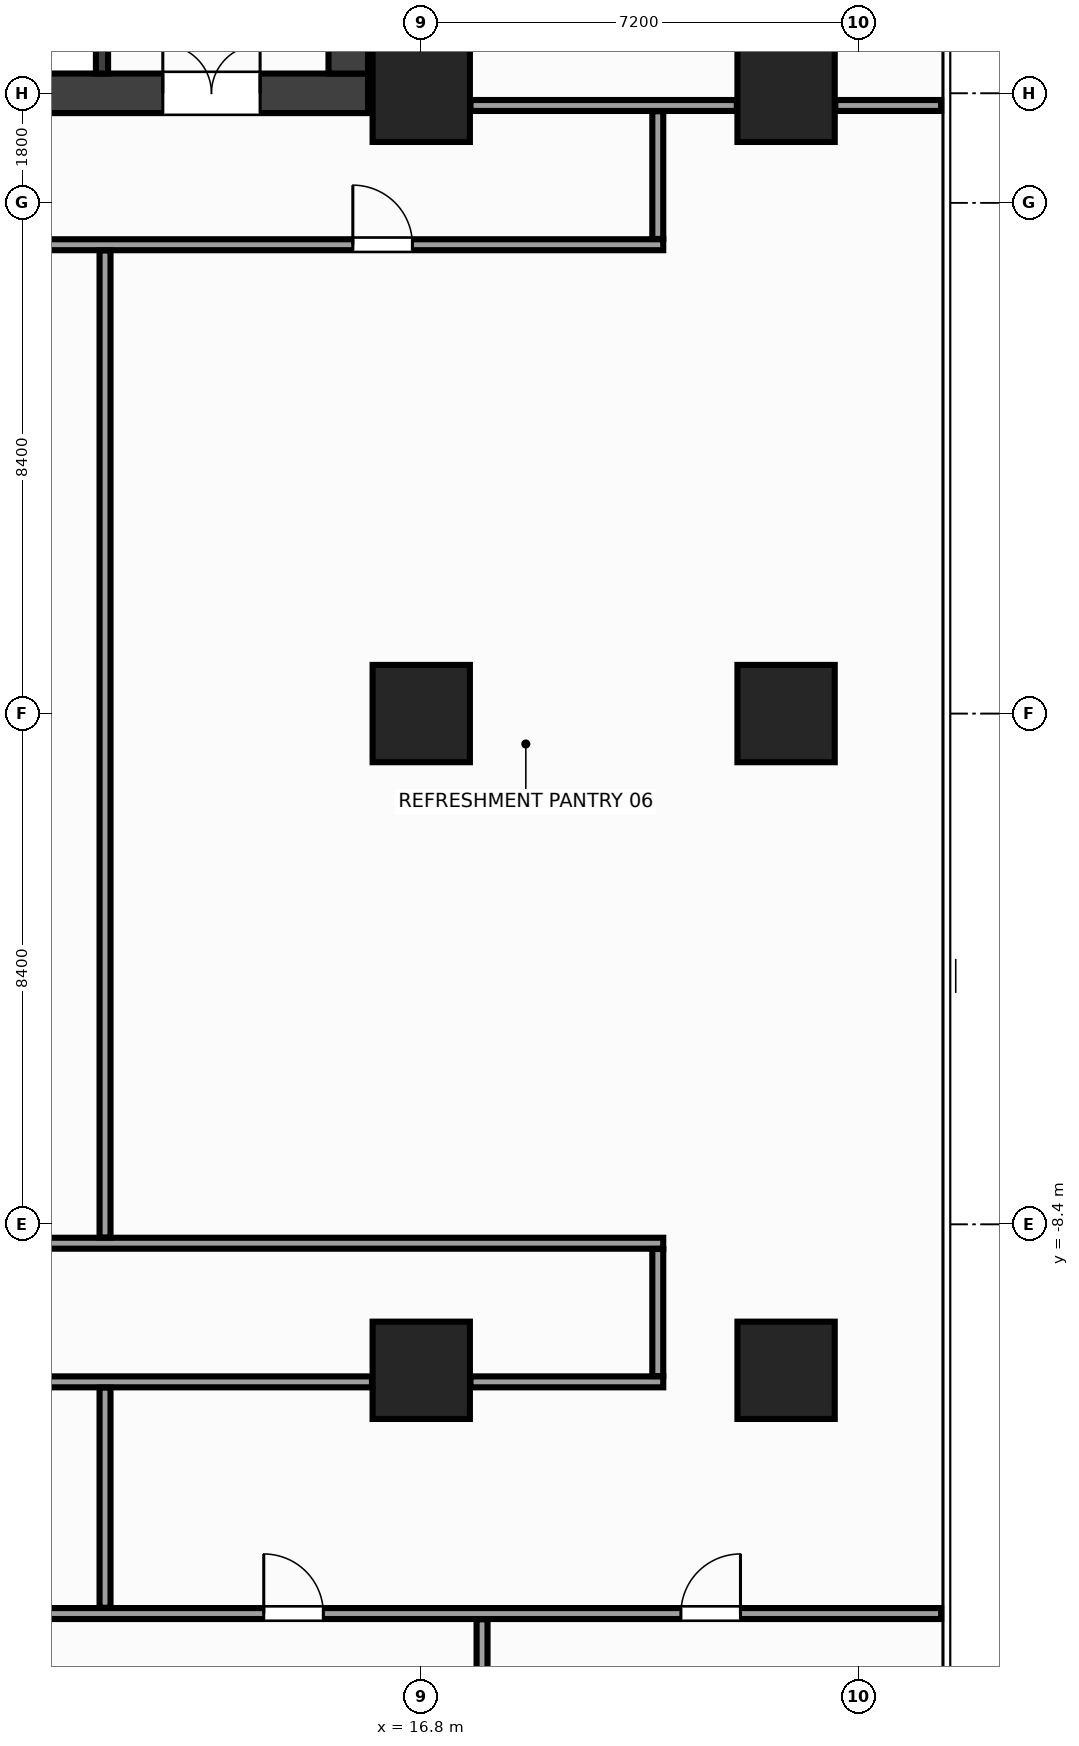
"""IFC4 building model, lengths in metres.
Left out: names, types, materials, properties, quantities, classifications, styles, units other than length and angle.
Written with IfcOpenShell. Run it as: python <this file> out.ifc"""

import sys

from ifc_helpers import new_model, si_unit, direction, frame, frame_2d, origin, origin_2d, place, context, subcontext, project, spatial, rectangle, extrude, source, transform, mapped, element, fill, save


model = new_model("IFC4")
c1 = context("Model", 3, precision=1e-05, world=origin(), true_north=direction((0.0, 1.0)))
c2 = subcontext(c1, "Body", "Model", "MODEL_VIEW")
j1 = project(units=[si_unit("LENGTHUNIT", "METRE"), si_unit("PLANEANGLEUNIT", "RADIAN")], contexts=[c1])
p1 = place(None, origin())
s1 = spatial("IfcSite", under=j1, at=p1, CompositionType="ELEMENT")
p2 = place(p1, origin())
s2 = spatial("IfcBuilding", under=s1, at=p2, CompositionType="ELEMENT")
p3 = place(p2, frame((0.0, 0.0, 117.2)))
s3 = spatial("IfcBuildingStorey", under=s2, at=p3, CompositionType="ELEMENT", Elevation=117.2)
m1 = source(origin(), c2, "Body", "SweptSolid", [
    extrude(rectangle(XDim=31.85, YDim=0.65, at=frame_2d((15.925, 0.0))), origin(), (0.0, 0.0, 1.0), 3.6),
])
p4 = place(p3, frame((-15.925, 10.2, 0.0), z_axis=(0.0, 0.0, 1.0), x_axis=(1.0, 0.0, 0.0)))
e1 = element("IfcWall", 1, at=p4, inside=s3, PredefinedType="SHEAR", context=c2, shape_type="MappedRepresentation", body=[
    mapped(m1, transform((0.0, 0.0, 0.0), x_axis=(1.0, 0.0, 0.0), y_axis=(0.0, 1.0, 0.0), z_axis=(0.0, 0.0, 1.0), scale=1.0)),
])
p5 = place(p4, frame((1.775, 0.0, 0.0)))
e2 = element("IfcOpeningElement", 2, at=p5, cuts=e1, PredefinedType="OPENING", context=c2, shape_type="SweptSolid", body=[
    extrude(rectangle(XDim=1.6, YDim=2.15, at=frame_2d((0.8, 1.075))), frame((0.0, 0.337, 0.0), z_axis=(0.0, -1.0, 0.0), x_axis=(1.0, 0.0, 0.0)), (0.0, 0.0, 1.0), 0.674),
])
p6 = place(p4, frame((28.475, 0.0, 0.0)))
e3 = element("IfcOpeningElement", 3, at=p6, cuts=e1, PredefinedType="OPENING", context=c2, shape_type="SweptSolid", body=[
    extrude(rectangle(XDim=1.6, YDim=2.15, at=frame_2d((0.8, 1.075))), frame((0.0, 0.337, 0.0), z_axis=(0.0, -1.0, 0.0), x_axis=(1.0, 0.0, 0.0)), (0.0, 0.0, 1.0), 0.674),
])
p7 = place(p4, frame((15.175, 0.0, 0.0)))
e4 = element("IfcOpeningElement", 4, at=p7, cuts=e1, PredefinedType="OPENING", context=c2, shape_type="SweptSolid", body=[
    extrude(rectangle(XDim=1.5, YDim=2.2, at=frame_2d((0.75, 1.1))), frame((0.0, 0.337, 0.0), z_axis=(0.0, -1.0, 0.0), x_axis=(1.0, 0.0, 0.0)), (0.0, 0.0, 1.0), 0.674),
])
m2 = source(origin(), c2, "Body", "SweptSolid", [
    extrude(rectangle(XDim=12.95, YDim=0.65, at=frame_2d((6.475, 0.0))), origin(), (0.0, 0.0, 1.0), 3.6),
])
p8 = place(p3, frame((15.6, 10.525, 0.0), z_axis=(0.0, 0.0, 1.0), x_axis=(0.0, 1.0, 0.0)))
e5 = element("IfcWall", 5, at=p8, inside=s3, PredefinedType="SHEAR", context=c2, shape_type="MappedRepresentation", body=[
    mapped(m2, transform((0.0, 0.0, 0.0), x_axis=(1.0, 0.0, 0.0), y_axis=(0.0, 1.0, 0.0), z_axis=(0.0, 0.0, 1.0), scale=1.0)),
])
m3 = source(origin(), c2, "Body", "SweptSolid", [
    extrude(rectangle(XDim=3.125, YDim=0.2, at=frame_2d((1.562, 0.0))), origin(), (0.0, 0.0, 1.0), 3.6),
])
p9 = place(p3, frame((11.55, 10.525, 0.0), z_axis=(0.0, 0.0, 1.0), x_axis=(0.0, 1.0, 0.0)))
e6 = element("IfcWall", 6, at=p9, inside=s3, PredefinedType="SHEAR", context=c2, shape_type="MappedRepresentation", body=[
    mapped(m3, transform((0.0, 0.0, 0.0), x_axis=(1.0, 0.0, 0.0), y_axis=(0.0, 1.0, 0.0), z_axis=(0.0, 0.0, 1.0), scale=1.0)),
])
p10 = place(p9, frame((0.9, 0.0, 0.0)))
e7 = element("IfcOpeningElement", 7, at=p10, cuts=e6, PredefinedType="OPENING", context=c2, shape_type="SweptSolid", body=[
    extrude(rectangle(XDim=1.1, YDim=2.15, at=frame_2d((0.55, 1.075))), frame((0.0, 0.112, 0.0), z_axis=(0.0, -1.0, 0.0), x_axis=(1.0, 0.0, 0.0)), (0.0, 0.0, 1.0), 0.224),
])
m4 = source(origin(), c2, "Body", "SweptSolid", [
    extrude(rectangle(XDim=1.6, YDim=1.6, at=origin_2d()), origin(), (0.0, 0.0, 1.0), 3.6),
])
for number, where, z_axis, x_axis in (
    (8, (16.8, -10.8, 0.0), (0.0, 0.0, 1.0), (1.0, 0.0, 0.0)),
    (9, (16.8, 0.0, 0.0), (0.0, 0.0, 1.0), (1.0, 0.0, 0.0)),
    (10, (16.8, 10.2, 0.0), (0.0, 0.0, 1.0), (1.0, 0.0, 0.0)),
    (11, (22.8, -10.8, 0.0), (0.0, 0.0, 1.0), (1.0, 0.0, 0.0)),
    (12, (22.8, 0.0, 0.0), (0.0, 0.0, 1.0), (1.0, 0.0, 0.0)),
    (13, (22.8, 10.2, 0.0), (0.0, 0.0, 1.0), (1.0, 0.0, 0.0)),
):
    element("IfcColumn", number, at=place(p3, frame(where, z_axis=z_axis, x_axis=x_axis)), inside=s3, PredefinedType="COLUMN", context=c2, shape_type="MappedRepresentation", body=[
        mapped(m4, transform((0.0, 0.0, 0.0), x_axis=(1.0, 0.0, 0.0), y_axis=(0.0, 1.0, 0.0), z_axis=(0.0, 0.0, 1.0), scale=1.0)),
    ])
m5 = source(origin(), c2, "Body", "SweptSolid", [
    extrude(rectangle(XDim=4.38, YDim=0.18, at=frame_2d((2.19, 0.0))), origin(), (0.0, 0.0, 1.0), 2.745),
])
p11 = place(p3, frame((17.61, 10.0, 0.0), z_axis=(0.0, 0.0, 1.0), x_axis=(1.0, 0.0, 0.0)))
e14 = element("IfcWall", 14, at=p11, inside=s3, PredefinedType="PARTITIONING", context=c2, shape_type="MappedRepresentation", body=[
    mapped(m5, transform((0.0, 0.0, 0.0), x_axis=(1.0, 0.0, 0.0), y_axis=(0.0, 1.0, 0.0), z_axis=(0.0, 0.0, 1.0), scale=1.0)),
])
m6 = source(origin(), c2, "Body", "SweptSolid", [
    extrude(rectangle(XDim=1.74, YDim=0.18, at=frame_2d((0.87, 0.0))), origin(), (0.0, 0.0, 1.0), 3.36),
])
p12 = place(p3, frame((23.61, 10.0, 0.0), z_axis=(0.0, 0.0, 1.0), x_axis=(1.0, 0.0, 0.0)))
e15 = element("IfcWall", 15, at=p12, inside=s3, PredefinedType="PARTITIONING", context=c2, shape_type="MappedRepresentation", body=[
    mapped(m6, transform((0.0, 0.0, 0.0), x_axis=(1.0, 0.0, 0.0), y_axis=(0.0, 1.0, 0.0), z_axis=(0.0, 0.0, 1.0), scale=1.0)),
])
m7 = source(origin(), c2, "Body", "SweptSolid", [
    extrude(rectangle(XDim=22.3, YDim=0.18, at=frame_2d((11.15, 0.0))), origin(), (0.0, 0.0, 1.0), 2.745),
])
p13 = place(p3, frame((-1.52, 7.71, 0.0), z_axis=(0.0, 0.0, 1.0), x_axis=(1.0, 0.0, 0.0)))
e16 = element("IfcWall", 16, at=p13, inside=s3, PredefinedType="PARTITIONING", context=c2, shape_type="MappedRepresentation", body=[
    mapped(m7, transform((0.0, 0.0, 0.0), x_axis=(1.0, 0.0, 0.0), y_axis=(0.0, 1.0, 0.0), z_axis=(0.0, 0.0, 1.0), scale=1.0)),
])
p14 = place(p13, frame((0.685, 0.0, 0.0)))
e17 = element("IfcOpeningElement", 17, at=p14, cuts=e16, PredefinedType="OPENING", context=c2, shape_type="SweptSolid", body=[
    extrude(rectangle(XDim=0.98, YDim=2.15, at=frame_2d((0.49, 1.075))), frame((0.0, 0.102, 0.0), z_axis=(0.0, -1.0, 0.0), x_axis=(1.0, 0.0, 0.0)), (0.0, 0.0, 1.0), 0.204),
])
p15 = place(p13, frame((7.23, 0.0, 0.0)))
e18 = element("IfcOpeningElement", 18, at=p15, cuts=e16, PredefinedType="OPENING", context=c2, shape_type="SweptSolid", body=[
    extrude(rectangle(XDim=0.98, YDim=2.15, at=frame_2d((0.49, 1.075))), frame((0.0, 0.102, 0.0), z_axis=(0.0, -1.0, 0.0), x_axis=(1.0, 0.0, 0.0)), (0.0, 0.0, 1.0), 0.204),
])
p16 = place(p13, frame((17.195, 0.0, 0.0)))
e19 = element("IfcOpeningElement", 19, at=p16, cuts=e16, PredefinedType="OPENING", context=c2, shape_type="SweptSolid", body=[
    extrude(rectangle(XDim=0.98, YDim=2.15, at=frame_2d((0.49, 1.075))), frame((0.0, 0.102, 0.0), z_axis=(0.0, -1.0, 0.0), x_axis=(1.0, 0.0, 0.0)), (0.0, 0.0, 1.0), 0.204),
])
p17 = place(p3, frame((-1.52, -8.71, 0.0), z_axis=(0.0, 0.0, 1.0), x_axis=(1.0, 0.0, 0.0)))
e20 = element("IfcWall", 20, at=p17, inside=s3, PredefinedType="PARTITIONING", context=c2, shape_type="MappedRepresentation", body=[
    mapped(m7, transform((0.0, 0.0, 0.0), x_axis=(1.0, 0.0, 0.0), y_axis=(0.0, 1.0, 0.0), z_axis=(0.0, 0.0, 1.0), scale=1.0)),
])
m8 = source(origin(), c2, "Body", "SweptSolid", [
    extrude(rectangle(XDim=7.08, YDim=0.18, at=frame_2d((3.54, 0.0))), origin(), (0.0, 0.0, 1.0), 2.745),
])
p18 = place(p3, frame((8.91, -10.99, 0.0), z_axis=(0.0, 0.0, 1.0), x_axis=(1.0, 0.0, 0.0)))
e21 = element("IfcWall", 21, at=p18, inside=s3, PredefinedType="PARTITIONING", context=c2, shape_type="MappedRepresentation", body=[
    mapped(m8, transform((0.0, 0.0, 0.0), x_axis=(1.0, 0.0, 0.0), y_axis=(0.0, 1.0, 0.0), z_axis=(0.0, 0.0, 1.0), scale=1.0)),
])
m9 = source(origin(), c2, "Body", "SweptSolid", [
    extrude(rectangle(XDim=3.17, YDim=0.18, at=frame_2d((1.585, 0.0))), origin(), (0.0, 0.0, 1.0), 2.745),
])
p19 = place(p3, frame((17.61, -10.99, 0.0), z_axis=(0.0, 0.0, 1.0), x_axis=(1.0, 0.0, 0.0)))
e22 = element("IfcWall", 22, at=p19, inside=s3, PredefinedType="PARTITIONING", context=c2, shape_type="MappedRepresentation", body=[
    mapped(m9, transform((0.0, 0.0, 0.0), x_axis=(1.0, 0.0, 0.0), y_axis=(0.0, 1.0, 0.0), z_axis=(0.0, 0.0, 1.0), scale=1.0)),
])
m10 = source(origin(), c2, "Body", "SweptSolid", [
    extrude(rectangle(XDim=2.1, YDim=0.18, at=frame_2d((1.05, 0.0))), origin(), (0.0, 0.0, 1.0), 3.36),
])
p20 = place(p3, frame((20.69, 7.805, 0.0), z_axis=(0.0, 0.0, 1.0), x_axis=(0.0, 1.0, 0.0)))
e23 = element("IfcWall", 23, at=p20, inside=s3, PredefinedType="PARTITIONING", context=c2, shape_type="MappedRepresentation", body=[
    mapped(m10, transform((0.0, 0.0, 0.0), x_axis=(1.0, 0.0, 0.0), y_axis=(0.0, 1.0, 0.0), z_axis=(0.0, 0.0, 1.0), scale=1.0)),
])
m11 = source(origin(), c2, "Body", "SweptSolid", [
    extrude(rectangle(XDim=2.09, YDim=0.18, at=frame_2d((1.045, 0.0))), origin(), (0.0, 0.0, 1.0), 3.36),
])
p21 = place(p3, frame((20.69, -10.895, 0.0), z_axis=(0.0, 0.0, 1.0), x_axis=(0.0, 1.0, 0.0)))
e24 = element("IfcWall", 24, at=p21, inside=s3, PredefinedType="PARTITIONING", context=c2, shape_type="MappedRepresentation", body=[
    mapped(m11, transform((0.0, 0.0, 0.0), x_axis=(1.0, 0.0, 0.0), y_axis=(0.0, 1.0, 0.0), z_axis=(0.0, 0.0, 1.0), scale=1.0)),
])
m12 = source(origin(), c2, "Body", "SweptSolid", [
    extrude(rectangle(XDim=50.7, YDim=0.18, at=frame_2d((25.35, 0.0))), origin(), (0.0, 0.0, 1.0), 2.945),
])
p22 = place(p3, frame((-25.35, -14.8, 0.0), z_axis=(0.0, 0.0, 1.0), x_axis=(1.0, 0.0, 0.0)))
e25 = element("IfcWall", 25, at=p22, inside=s3, PredefinedType="PARTITIONING", context=c2, shape_type="MappedRepresentation", body=[
    mapped(m12, transform((0.0, 0.0, 0.0), x_axis=(1.0, 0.0, 0.0), y_axis=(0.0, 1.0, 0.0), z_axis=(0.0, 0.0, 1.0), scale=1.0)),
])
p23 = place(p22, frame((2.7, 0.0, 0.0)))
e26 = element("IfcOpeningElement", 26, at=p23, cuts=e25, PredefinedType="OPENING", context=c2, shape_type="SweptSolid", body=[
    extrude(rectangle(XDim=0.98, YDim=2.15, at=frame_2d((0.49, 1.075))), frame((0.0, 0.102, 0.0), z_axis=(0.0, -1.0, 0.0), x_axis=(1.0, 0.0, 0.0)), (0.0, 0.0, 1.0), 0.204),
])
p24 = place(p22, frame((46.42, 0.0, 0.0)))
e27 = element("IfcOpeningElement", 27, at=p24, cuts=e25, PredefinedType="OPENING", context=c2, shape_type="SweptSolid", body=[
    extrude(rectangle(XDim=0.98, YDim=2.15, at=frame_2d((0.49, 1.075))), frame((0.0, 0.102, 0.0), z_axis=(0.0, -1.0, 0.0), x_axis=(1.0, 0.0, 0.0)), (0.0, 0.0, 1.0), 0.204),
])
p25 = place(p22, frame((13.16, 0.0, 0.0)))
e28 = element("IfcOpeningElement", 28, at=p25, cuts=e25, PredefinedType="OPENING", context=c2, shape_type="SweptSolid", body=[
    extrude(rectangle(XDim=0.98, YDim=2.15, at=frame_2d((0.49, 1.075))), frame((0.0, 0.102, 0.0), z_axis=(0.0, -1.0, 0.0), x_axis=(1.0, 0.0, 0.0)), (0.0, 0.0, 1.0), 0.204),
])
p26 = place(p22, frame((22.16, 0.0, 0.0)))
e29 = element("IfcOpeningElement", 29, at=p26, cuts=e25, PredefinedType="OPENING", context=c2, shape_type="SweptSolid", body=[
    extrude(rectangle(XDim=0.98, YDim=2.15, at=frame_2d((0.49, 1.075))), frame((0.0, 0.102, 0.0), z_axis=(0.0, -1.0, 0.0), x_axis=(1.0, 0.0, 0.0)), (0.0, 0.0, 1.0), 0.204),
])
p27 = place(p22, frame((30.66, 0.0, 0.0)))
e30 = element("IfcOpeningElement", 30, at=p27, cuts=e25, PredefinedType="OPENING", context=c2, shape_type="SweptSolid", body=[
    extrude(rectangle(XDim=0.98, YDim=2.15, at=frame_2d((0.49, 1.075))), frame((0.0, 0.102, 0.0), z_axis=(0.0, -1.0, 0.0), x_axis=(1.0, 0.0, 0.0)), (0.0, 0.0, 1.0), 0.204),
])
p28 = place(p22, frame((8.96, 0.0, 0.0)))
e31 = element("IfcOpeningElement", 31, at=p28, cuts=e25, PredefinedType="OPENING", context=c2, shape_type="SweptSolid", body=[
    extrude(rectangle(XDim=0.98, YDim=2.15, at=frame_2d((0.49, 1.075))), frame((0.0, 0.102, 0.0), z_axis=(0.0, -1.0, 0.0), x_axis=(1.0, 0.0, 0.0)), (0.0, 0.0, 1.0), 0.204),
])
p29 = place(p22, frame((39.56, 0.0, 0.0)))
e32 = element("IfcOpeningElement", 32, at=p29, cuts=e25, PredefinedType="OPENING", context=c2, shape_type="SweptSolid", body=[
    extrude(rectangle(XDim=0.98, YDim=2.15, at=frame_2d((0.49, 1.075))), frame((0.0, 0.102, 0.0), z_axis=(0.0, -1.0, 0.0), x_axis=(1.0, 0.0, 0.0)), (0.0, 0.0, 1.0), 0.204),
])
m13 = source(origin(), c2, "Body", "SweptSolid", [
    extrude(rectangle(XDim=3.62, YDim=0.18, at=frame_2d((1.81, 0.0))), origin(), (0.0, 0.0, 1.0), 3.36),
])
p30 = place(p3, frame((11.6, -14.705, 0.0), z_axis=(0.0, 0.0, 1.0), x_axis=(0.0, 1.0, 0.0)))
e33 = element("IfcWall", 33, at=p30, inside=s3, PredefinedType="PARTITIONING", context=c2, shape_type="MappedRepresentation", body=[
    mapped(m13, transform((0.0, 0.0, 0.0), x_axis=(1.0, 0.0, 0.0), y_axis=(0.0, 1.0, 0.0), z_axis=(0.0, 0.0, 1.0), scale=1.0)),
])
m14 = source(origin(), c2, "Body", "SweptSolid", [
    extrude(rectangle(XDim=16.23, YDim=0.18, at=frame_2d((8.115, 0.0))), origin(), (0.0, 0.0, 1.0), 2.645),
])
p31 = place(p3, frame((11.6, -8.615, 0.0), z_axis=(0.0, 0.0, 1.0), x_axis=(0.0, 1.0, 0.0)))
e34 = element("IfcWall", 34, at=p31, inside=s3, PredefinedType="PARTITIONING", context=c2, shape_type="MappedRepresentation", body=[
    mapped(m14, transform((0.0, 0.0, 0.0), x_axis=(1.0, 0.0, 0.0), y_axis=(0.0, 1.0, 0.0), z_axis=(0.0, 0.0, 1.0), scale=1.0)),
])
m15 = source(origin(), c2, "Body", "SweptSolid", [
    extrude(rectangle(XDim=10.755, YDim=0.18, at=frame_2d((5.377, 0.0))), origin(), (0.0, 0.0, 1.0), 2.745),
])
p32 = place(p3, frame((17.8, -25.65, 0.0), z_axis=(0.0, 0.0, 1.0), x_axis=(0.0, 1.0, 0.0)))
e35 = element("IfcWall", 35, at=p32, inside=s3, PredefinedType="PARTITIONING", context=c2, shape_type="MappedRepresentation", body=[
    mapped(m15, transform((0.0, 0.0, 0.0), x_axis=(1.0, 0.0, 0.0), y_axis=(0.0, 1.0, 0.0), z_axis=(0.0, 0.0, 1.0), scale=1.0)),
])
m16 = source(origin(), c2, "Body", "SweptSolid", [
    extrude(rectangle(XDim=1.6, YDim=2.15, at=frame_2d((0.8, 1.075))), frame((0.0, 0.025, 0.0), z_axis=(0.0, -1.0, 0.0), x_axis=(1.0, 0.0, 0.0)), (0.0, 0.0, 1.0), 0.05),
])
p33 = place(p6, origin())
e36 = element("IfcDoor", 36, at=p33, inside=s3, OperationType="DOUBLE_DOOR_SINGLE_SWING", PredefinedType="DOOR", context=c2, shape_type="MappedRepresentation", body=[
    mapped(m16, transform((0.0, 0.0, 0.0), x_axis=(1.0, 0.0, 0.0), y_axis=(0.0, 1.0, 0.0), z_axis=(0.0, 0.0, 1.0), scale=1.0)),
])
fill(e3, e36)
m17 = source(origin(), c2, "Body", "SweptSolid", [
    extrude(rectangle(XDim=0.98, YDim=2.15, at=frame_2d((0.49, 1.075))), frame((0.0, 0.025, 0.0), z_axis=(0.0, -1.0, 0.0), x_axis=(1.0, 0.0, 0.0)), (0.0, 0.0, 1.0), 0.05),
])
p34 = place(p16, origin())
e37 = element("IfcDoor", 37, at=p34, inside=s3, OperationType="SINGLE_SWING_LEFT", PredefinedType="DOOR", context=c2, shape_type="MappedRepresentation", body=[
    mapped(m17, transform((0.0, 0.0, 0.0), x_axis=(1.0, 0.0, 0.0), y_axis=(0.0, 1.0, 0.0), z_axis=(0.0, 0.0, 1.0), scale=1.0)),
])
fill(e19, e37)
p35 = place(p24, origin())
e38 = element("IfcDoor", 38, at=p35, inside=s3, OperationType="SINGLE_SWING_RIGHT", PredefinedType="DOOR", context=c2, shape_type="MappedRepresentation", body=[
    mapped(m17, transform((0.0, 0.0, 0.0), x_axis=(1.0, 0.0, 0.0), y_axis=(0.0, 1.0, 0.0), z_axis=(0.0, 0.0, 1.0), scale=1.0)),
])
fill(e27, e38)
p36 = place(p29, origin())
e39 = element("IfcDoor", 39, at=p36, inside=s3, OperationType="SINGLE_SWING_LEFT", PredefinedType="DOOR", context=c2, shape_type="MappedRepresentation", body=[
    mapped(m17, transform((0.0, 0.0, 0.0), x_axis=(1.0, 0.0, 0.0), y_axis=(0.0, 1.0, 0.0), z_axis=(0.0, 0.0, 1.0), scale=1.0)),
])
fill(e32, e39)
save(model, sys.argv[1])
